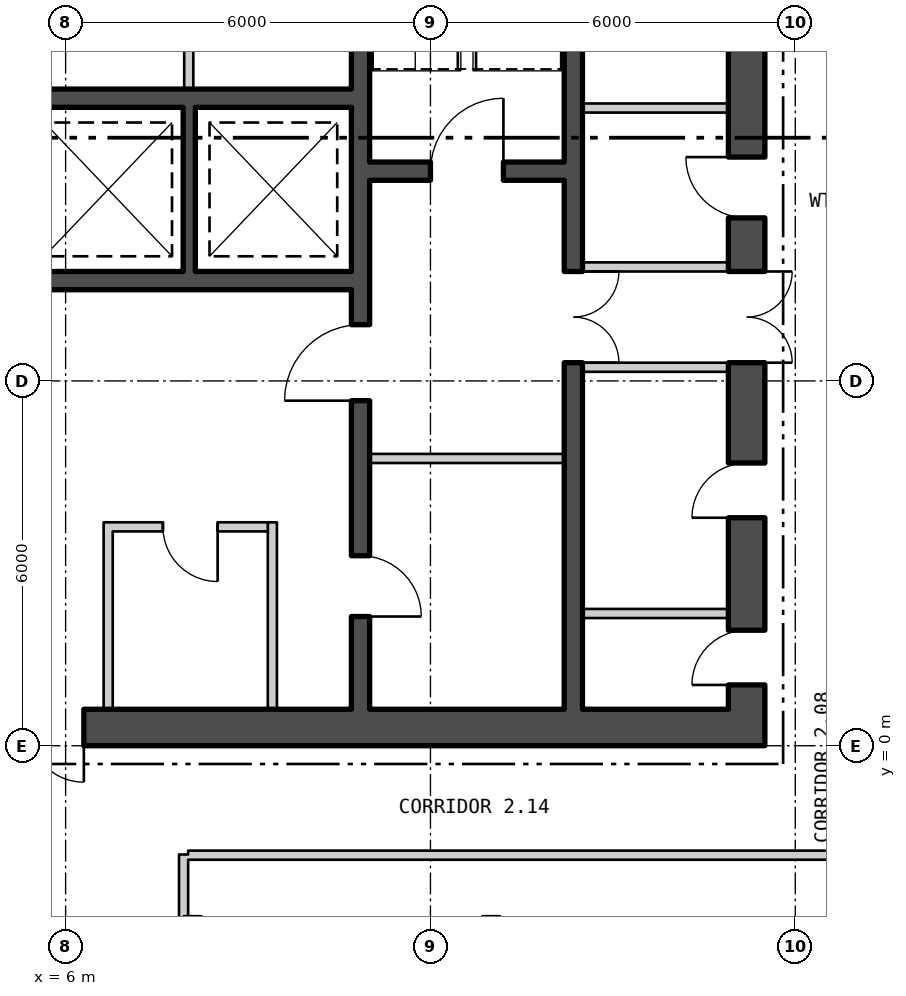
"""IFC4 building model, lengths in metres.
Left out: names, types, materials, properties, quantities, classifications, styles, units other than length and angle.
Written with IfcOpenShell. Run it as: python <this file> out.ifc"""

import sys

from ifc_helpers import new_model, si_unit, direction, frame, frame_2d, origin, origin_2d, place, context, subcontext, project, spatial, polyline, rectangle, i_section, outline, extrude, element, fill, save


model = new_model("IFC4")
c1 = context("Model", 3, precision=1e-05, world=origin(), true_north=direction((0.0, 1.0)))
c2 = subcontext(c1, "Body", "Model", "MODEL_VIEW")
j1 = project(units=[si_unit("LENGTHUNIT", "METRE"), si_unit("PLANEANGLEUNIT", "RADIAN")], contexts=[c1])
p1 = place(None, origin())
s1 = spatial("IfcSite", under=j1, at=p1, CompositionType="ELEMENT")
p2 = place(p1, origin())
s2 = spatial("IfcBuilding", under=s1, at=p2, CompositionType="ELEMENT")
p3 = place(p2, frame((0.0, 0.0, 33.3)))
s3 = spatial("IfcBuildingStorey", under=s2, at=p3, CompositionType="ELEMENT", Elevation=33.3)
for number, where, z_axis, x_axis in (
    (1, (8.09, -3.2, 0.0), (0.0, 0.0, 1.0), (1.0, 0.0, 0.0)),
    (2, (13.0, -3.2, 0.0), (0.0, 0.0, 1.0), (1.0, 0.0, 0.0)),
):
    element("IfcColumn", number, at=place(p3, frame(where, z_axis=z_axis, x_axis=x_axis)), inside=s3, PredefinedType="COLUMN", context=c2, shape_type="SweptSolid", body=[
        extrude(i_section(OverallWidth=0.303, OverallDepth=0.814, WebThickness=0.021, FlangeThickness=0.04, at=origin_2d()), origin(), (0.0, 0.0, 1.0), 4.5),
    ])
p4 = place(p3, frame((5.75, -29.605, -0.18), z_axis=(0.0, 0.0, 1.0), x_axis=(0.500000335318, 0.866025210188, 0.0)))
e3 = element("IfcWall", 3, at=p4, inside=s3, PredefinedType="SOLIDWALL", context=c2, shape_type="SweptSolid", body=[
    extrude(outline(polyline([(-0.13, -0.225), (45.88, -0.225), (45.62, 0.225), (0.13, 0.225), (-0.13, -0.225)])), origin(), (0.0, 0.0, 1.0), 4.28),
])
p5 = place(p4, frame((1.425, 0.0, 1.08)))
e4 = element("IfcOpeningElement", 4, at=p5, cuts=e3, PredefinedType="OPENING", context=c2, shape_type="SweptSolid", body=[
    extrude(rectangle(XDim=2.4, YDim=2.6, at=frame_2d((1.2, 1.3))), frame((0.0, 0.235, 0.0), z_axis=(0.0, -1.0, 0.0), x_axis=(1.0, 0.0, 0.0)), (0.0, 0.0, 1.0), 0.47),
])
p6 = place(p4, frame((5.895, 0.0, 1.08)))
e5 = element("IfcOpeningElement", 5, at=p6, cuts=e3, PredefinedType="OPENING", context=c2, shape_type="SweptSolid", body=[
    extrude(rectangle(XDim=2.4, YDim=2.6, at=frame_2d((1.2, 1.3))), frame((0.0, 0.235, 0.0), z_axis=(0.0, -1.0, 0.0), x_axis=(1.0, 0.0, 0.0)), (0.0, 0.0, 1.0), 0.47),
])
p7 = place(p4, frame((10.403, 0.0, 1.08)))
e6 = element("IfcOpeningElement", 6, at=p7, cuts=e3, PredefinedType="OPENING", context=c2, shape_type="SweptSolid", body=[
    extrude(rectangle(XDim=2.4, YDim=2.6, at=frame_2d((1.2, 1.3))), frame((0.0, 0.235, 0.0), z_axis=(0.0, -1.0, 0.0), x_axis=(1.0, 0.0, 0.0)), (0.0, 0.0, 1.0), 0.47),
])
p8 = place(p4, frame((14.912, 0.0, 1.08)))
e7 = element("IfcOpeningElement", 7, at=p8, cuts=e3, PredefinedType="OPENING", context=c2, shape_type="SweptSolid", body=[
    extrude(rectangle(XDim=2.4, YDim=2.6, at=frame_2d((1.2, 1.3))), frame((0.0, 0.235, 0.0), z_axis=(0.0, -1.0, 0.0), x_axis=(1.0, 0.0, 0.0)), (0.0, 0.0, 1.0), 0.47),
])
p9 = place(p4, frame((19.421, 0.0, 1.08)))
e8 = element("IfcOpeningElement", 8, at=p9, cuts=e3, PredefinedType="OPENING", context=c2, shape_type="SweptSolid", body=[
    extrude(rectangle(XDim=2.4, YDim=2.6, at=frame_2d((1.2, 1.3))), frame((0.0, 0.235, 0.0), z_axis=(0.0, -1.0, 0.0), x_axis=(1.0, 0.0, 0.0)), (0.0, 0.0, 1.0), 0.47),
])
p10 = place(p4, frame((23.929, 0.0, 1.08)))
e9 = element("IfcOpeningElement", 9, at=p10, cuts=e3, PredefinedType="OPENING", context=c2, shape_type="SweptSolid", body=[
    extrude(rectangle(XDim=2.4, YDim=2.6, at=frame_2d((1.2, 1.3))), frame((0.0, 0.235, 0.0), z_axis=(0.0, -1.0, 0.0), x_axis=(1.0, 0.0, 0.0)), (0.0, 0.0, 1.0), 0.47),
])
p11 = place(p4, frame((28.438, 0.0, 1.08)))
e10 = element("IfcOpeningElement", 10, at=p11, cuts=e3, PredefinedType="OPENING", context=c2, shape_type="SweptSolid", body=[
    extrude(rectangle(XDim=2.4, YDim=2.6, at=frame_2d((1.2, 1.3))), frame((0.0, 0.235, 0.0), z_axis=(0.0, -1.0, 0.0), x_axis=(1.0, 0.0, 0.0)), (0.0, 0.0, 1.0), 0.47),
])
p12 = place(p4, frame((32.947, 0.0, 1.08)))
e11 = element("IfcOpeningElement", 11, at=p12, cuts=e3, PredefinedType="OPENING", context=c2, shape_type="SweptSolid", body=[
    extrude(rectangle(XDim=2.4, YDim=2.6, at=frame_2d((1.2, 1.3))), frame((0.0, 0.235, 0.0), z_axis=(0.0, -1.0, 0.0), x_axis=(1.0, 0.0, 0.0)), (0.0, 0.0, 1.0), 0.47),
])
p13 = place(p4, frame((37.455, 0.0, 1.08)))
e12 = element("IfcOpeningElement", 12, at=p13, cuts=e3, PredefinedType="OPENING", context=c2, shape_type="SweptSolid", body=[
    extrude(rectangle(XDim=2.4, YDim=2.6, at=frame_2d((1.2, 1.3))), frame((0.0, 0.235, 0.0), z_axis=(0.0, -1.0, 0.0), x_axis=(1.0, 0.0, 0.0)), (0.0, 0.0, 1.0), 0.47),
])
p14 = place(p4, frame((41.925, 0.0, 1.08)))
e13 = element("IfcOpeningElement", 13, at=p14, cuts=e3, PredefinedType="OPENING", context=c2, shape_type="SweptSolid", body=[
    extrude(rectangle(XDim=2.4, YDim=2.6, at=frame_2d((1.2, 1.3))), frame((0.0, 0.235, 0.0), z_axis=(0.0, -1.0, 0.0), x_axis=(1.0, 0.0, 0.0)), (0.0, 0.0, 1.0), 0.47),
])
p15 = place(p3, frame((-17.5, 0.3, 0.0), z_axis=(0.0, 0.0, 1.0), x_axis=(1.0, 0.0, 0.0)))
e14 = element("IfcWall", 14, at=p15, inside=s3, PredefinedType="SHEAR", context=c2, shape_type="SweptSolid", body=[
    extrude(rectangle(XDim=35.0, YDim=0.6, at=frame_2d((17.5, 0.0))), origin(), (0.0, 0.0, 1.0), 4.3),
])
p16 = place(p15, frame((12.0, 0.0, 0.0)))
e15 = element("IfcOpeningElement", 15, at=p16, cuts=e14, PredefinedType="OPENING", context=c2, shape_type="SweptSolid", body=[
    extrude(rectangle(XDim=1.8, YDim=2.4, at=frame_2d((0.9, 1.2))), frame((0.0, 0.31, 0.0), z_axis=(0.0, -1.0, 0.0), x_axis=(1.0, 0.0, 0.0)), (0.0, 0.0, 1.0), 0.62),
])
p17 = place(p15, frame((22.0, 0.0, 0.0)))
e16 = element("IfcOpeningElement", 16, at=p17, cuts=e14, PredefinedType="OPENING", context=c2, shape_type="SweptSolid", body=[
    extrude(rectangle(XDim=1.8, YDim=2.4, at=frame_2d((0.9, 1.2))), frame((0.0, 0.31, 0.0), z_axis=(0.0, -1.0, 0.0), x_axis=(1.0, 0.0, 0.0)), (0.0, 0.0, 1.0), 0.62),
])
p18 = place(p3, frame((17.2, 0.6, 0.0), z_axis=(0.0, 0.0, 1.0), x_axis=(0.0, 1.0, 0.0)))
e17 = element("IfcWall", 17, at=p18, inside=s3, PredefinedType="SHEAR", context=c2, shape_type="SweptSolid", body=[
    extrude(rectangle(XDim=16.8, YDim=0.6, at=frame_2d((8.4, 0.0))), origin(), (0.0, 0.0, 1.0), 4.3),
])
p19 = place(p18, frame((5.7, 0.0, 0.0)))
e18 = element("IfcOpeningElement", 18, at=p19, cuts=e17, PredefinedType="OPENING", context=c2, shape_type="SweptSolid", body=[
    extrude(rectangle(XDim=1.5, YDim=2.1, at=frame_2d((0.75, 1.05))), frame((0.0, 0.31, 0.0), z_axis=(0.0, -1.0, 0.0), x_axis=(1.0, 0.0, 0.0)), (0.0, 0.0, 1.0), 0.62),
])
p20 = place(p18, frame((0.4, 0.0, 0.0)))
e19 = element("IfcOpeningElement", 19, at=p20, cuts=e17, PredefinedType="OPENING", context=c2, shape_type="SweptSolid", body=[
    extrude(rectangle(XDim=0.9, YDim=2.1, at=frame_2d((0.45, 1.05))), frame((0.0, 0.31, 0.0), z_axis=(0.0, -1.0, 0.0), x_axis=(1.0, 0.0, 0.0)), (0.0, 0.0, 1.0), 0.62),
])
p21 = place(p18, frame((3.15, 0.0, 0.0)))
e20 = element("IfcOpeningElement", 20, at=p21, cuts=e17, PredefinedType="OPENING", context=c2, shape_type="SweptSolid", body=[
    extrude(rectangle(XDim=0.9, YDim=2.1, at=frame_2d((0.45, 1.05))), frame((0.0, 0.31, 0.0), z_axis=(0.0, -1.0, 0.0), x_axis=(1.0, 0.0, 0.0)), (0.0, 0.0, 1.0), 0.62),
])
p22 = place(p18, frame((8.082, 0.0, 0.0)))
e21 = element("IfcOpeningElement", 21, at=p22, cuts=e17, PredefinedType="OPENING", context=c2, shape_type="SweptSolid", body=[
    extrude(rectangle(XDim=1.0, YDim=2.1, at=frame_2d((0.5, 1.05))), frame((0.0, 0.31, 0.0), z_axis=(0.0, -1.0, 0.0), x_axis=(1.0, 0.0, 0.0)), (0.0, 0.0, 1.0), 0.62),
])
p23 = place(p18, frame((11.801, 0.0, 0.0)))
e22 = element("IfcOpeningElement", 22, at=p23, cuts=e17, PredefinedType="OPENING", context=c2, shape_type="SweptSolid", body=[
    extrude(rectangle(XDim=0.9, YDim=2.1, at=frame_2d((0.45, 1.05))), frame((0.0, 0.31, 0.0), z_axis=(0.0, -1.0, 0.0), x_axis=(1.0, 0.0, 0.0)), (0.0, 0.0, 1.0), 0.62),
])
p24 = place(p18, frame((15.294, 0.0, 0.0)))
e23 = element("IfcOpeningElement", 23, at=p24, cuts=e17, PredefinedType="OPENING", context=c2, shape_type="SweptSolid", body=[
    extrude(rectangle(XDim=0.9, YDim=2.1, at=frame_2d((0.45, 1.05))), frame((0.0, 0.31, 0.0), z_axis=(0.0, -1.0, 0.0), x_axis=(1.0, 0.0, 0.0)), (0.0, 0.0, 1.0), 0.62),
])
p25 = place(p3, frame((10.85, 0.6, 0.0), z_axis=(0.0, 0.0, 1.0), x_axis=(0.0, 1.0, 0.0)))
e24 = element("IfcWall", 24, at=p25, inside=s3, PredefinedType="SHEAR", context=c2, shape_type="SweptSolid", body=[
    extrude(rectangle(XDim=16.8, YDim=0.3, at=frame_2d((8.4, 0.0))), origin(), (0.0, 0.0, 1.0), 4.3),
])
p26 = place(p25, frame((5.075, 0.0, 0.0)))
e25 = element("IfcOpeningElement", 25, at=p26, cuts=e24, PredefinedType="OPENING", context=c2, shape_type="SweptSolid", body=[
    extrude(rectangle(XDim=1.25, YDim=2.1, at=frame_2d((0.625, 1.05))), frame((0.0, 0.16, 0.0), z_axis=(0.0, -1.0, 0.0), x_axis=(1.0, 0.0, 0.0)), (0.0, 0.0, 1.0), 0.32),
])
p27 = place(p25, frame((1.525, 0.0, 0.0)))
e26 = element("IfcOpeningElement", 26, at=p27, cuts=e24, PredefinedType="OPENING", context=c2, shape_type="SweptSolid", body=[
    extrude(rectangle(XDim=1.0, YDim=2.1, at=frame_2d((0.5, 1.05))), frame((0.0, 0.16, 0.0), z_axis=(0.0, -1.0, 0.0), x_axis=(1.0, 0.0, 0.0)), (0.0, 0.0, 1.0), 0.32),
])
p28 = place(p3, frame((14.35, 0.6, 0.0), z_axis=(0.0, 0.0, 1.0), x_axis=(0.0, 1.0, 0.0)))
e27 = element("IfcWall", 27, at=p28, inside=s3, PredefinedType="SHEAR", context=c2, shape_type="SweptSolid", body=[
    extrude(rectangle(XDim=16.8, YDim=0.3, at=frame_2d((8.4, 0.0))), origin(), (0.0, 0.0, 1.0), 4.3),
])
p29 = place(p28, frame((5.7, 0.0, 0.0)))
e28 = element("IfcOpeningElement", 28, at=p29, cuts=e27, PredefinedType="OPENING", context=c2, shape_type="SweptSolid", body=[
    extrude(rectangle(XDim=1.5, YDim=2.1, at=frame_2d((0.75, 1.05))), frame((0.0, 0.16, 0.0), z_axis=(0.0, -1.0, 0.0), x_axis=(1.0, 0.0, 0.0)), (0.0, 0.0, 1.0), 0.32),
])
p30 = place(p3, frame((11.0, 9.45, 0.0), z_axis=(0.0, 0.0, 1.0), x_axis=(1.0, 0.0, 0.0)))
e29 = element("IfcWall", 29, at=p30, inside=s3, PredefinedType="SHEAR", context=c2, shape_type="SweptSolid", body=[
    extrude(rectangle(XDim=3.2, YDim=0.3, at=frame_2d((1.6, 0.0))), origin(), (0.0, 0.0, 1.0), 4.3),
])
p31 = place(p30, frame((1.0, 0.0, 0.0)))
e30 = element("IfcOpeningElement", 30, at=p31, cuts=e29, PredefinedType="OPENING", context=c2, shape_type="SweptSolid", body=[
    extrude(rectangle(XDim=1.2, YDim=2.1, at=frame_2d((0.6, 1.05))), frame((0.0, 0.16, 0.0), z_axis=(0.0, -1.0, 0.0), x_axis=(1.0, 0.0, 0.0)), (0.0, 0.0, 1.0), 0.32),
])
for number, where, z_axis, x_axis in (
    (31, (2.6, 10.65, 0.0), (0.0, 0.0, 1.0), (1.0, 0.0, 0.0)),
    (32, (2.6, 7.65, 0.0), (0.0, 0.0, 1.0), (1.0, 0.0, 0.0)),
):
    element("IfcWall", number, at=place(p3, frame(where, z_axis=z_axis, x_axis=x_axis)), inside=s3, PredefinedType="SHEAR", context=c2, shape_type="SweptSolid", body=[
        extrude(rectangle(XDim=8.1, YDim=0.3, at=frame_2d((4.05, 0.0))), origin(), (0.0, 0.0, 1.0), 4.3),
    ])
p32 = place(p3, frame((8.033, 7.8, 0.0), z_axis=(0.0, 0.0, 1.0), x_axis=(0.0, 1.0, 0.0)))
e33 = element("IfcWall", 33, at=p32, inside=s3, PredefinedType="SHEAR", context=c2, shape_type="SweptSolid", body=[
    extrude(rectangle(XDim=2.7, YDim=0.2, at=frame_2d((1.35, 0.0))), origin(), (0.0, 0.0, 1.0), 4.3),
])
p33 = place(p3, frame((8.025, 10.8, 0.0), z_axis=(0.0, 0.0, 1.0), x_axis=(0.0, 1.0, 0.0)))
e34 = element("IfcWall", 34, at=p33, inside=s3, PredefinedType="PARTITIONING", context=c2, shape_type="SweptSolid", body=[
    extrude(rectangle(XDim=3.6, YDim=0.15, at=frame_2d((1.8, 0.0))), origin(), (0.0, 0.0, 1.0), 4.3),
])
p34 = place(p33, frame((1.175, 0.0, 0.0)))
e35 = element("IfcOpeningElement", 35, at=p34, cuts=e34, PredefinedType="OPENING", context=c2, shape_type="SweptSolid", body=[
    extrude(rectangle(XDim=1.25, YDim=2.1, at=frame_2d((0.625, 1.05))), frame((0.0, 0.085, 0.0), z_axis=(0.0, -1.0, 0.0), x_axis=(1.0, 0.0, 0.0)), (0.0, 0.0, 1.0), 0.17),
])
p35 = place(p3, frame((11.0, 4.725, 0.0), z_axis=(0.0, 0.0, 1.0), x_axis=(1.0, 0.0, 0.0)))
e36 = element("IfcWall", 36, at=p35, inside=s3, PredefinedType="PARTITIONING", context=c2, shape_type="SweptSolid", body=[
    extrude(rectangle(XDim=3.2, YDim=0.15, at=frame_2d((1.6, 0.0))), origin(), (0.0, 0.0, 1.0), 4.3),
])
for number, where, z_axis, x_axis in (
    (37, (14.5, 6.225, 0.0), (0.0, 0.0, 1.0), (1.0, 0.0, 0.0)),
    (38, (14.5, 7.875, 0.0), (0.0, 0.0, 1.0), (1.0, 0.0, 0.0)),
    (39, (14.5, 2.175, 0.0), (0.0, 0.0, 1.0), (1.0, 0.0, 0.0)),
    (40, (14.5, 10.489, 0.0), (0.0, 0.0, 1.0), (1.0, 0.0, 0.0)),
):
    element("IfcWall", number, at=place(p3, frame(where, z_axis=z_axis, x_axis=x_axis)), inside=s3, PredefinedType="PARTITIONING", context=c2, shape_type="SweptSolid", body=[
        extrude(rectangle(XDim=2.4, YDim=0.15, at=frame_2d((1.2, 0.0))), origin(), (0.0, 0.0, 1.0), 4.3),
    ])
for number, where, z_axis, x_axis in (
    (41, (6.7, 0.6, 0.0), (0.0, 0.0, 1.0), (0.0, 1.0, 0.0)),
    (42, (9.4, 0.6, 0.0), (0.0, 0.0, 1.0), (0.0, 1.0, 0.0)),
):
    element("IfcWall", number, at=place(p3, frame(where, z_axis=z_axis, x_axis=x_axis)), inside=s3, PredefinedType="PARTITIONING", context=c2, shape_type="SweptSolid", body=[
        extrude(rectangle(XDim=3.075, YDim=0.15, at=frame_2d((1.538, 0.0))), origin(), (0.0, 0.0, 1.0), 4.3),
    ])
p36 = place(p3, frame((6.775, 3.6, 0.0), z_axis=(0.0, 0.0, 1.0), x_axis=(1.0, 0.0, 0.0)))
e43 = element("IfcWall", 43, at=p36, inside=s3, PredefinedType="PARTITIONING", context=c2, shape_type="SweptSolid", body=[
    extrude(rectangle(XDim=2.55, YDim=0.15, at=frame_2d((1.275, 0.0))), origin(), (0.0, 0.0, 1.0), 4.3),
])
p37 = place(p36, frame((0.825, 0.0, 0.0)))
e44 = element("IfcOpeningElement", 44, at=p37, cuts=e43, PredefinedType="OPENING", context=c2, shape_type="SweptSolid", body=[
    extrude(rectangle(XDim=0.9, YDim=2.1, at=frame_2d((0.45, 1.05))), frame((0.0, 0.085, 0.0), z_axis=(0.0, -1.0, 0.0), x_axis=(1.0, 0.0, 0.0)), (0.0, 0.0, 1.0), 0.17),
])
p38 = place(p3, frame((7.94, -3.557, 0.0), z_axis=(0.0, 0.0, 1.0), x_axis=(0.0, 1.0, 0.0)))
e45 = element("IfcWall", 45, at=p38, inside=s3, PredefinedType="PARTITIONING", context=c2, shape_type="SweptSolid", body=[
    extrude(rectangle(XDim=1.768, YDim=0.15, at=frame_2d((0.884, 0.0))), origin(), (0.0, 0.0, 1.0), 4.3),
])
p39 = place(p3, frame((8.015, -1.8, 0.0), z_axis=(0.0, 0.0, 1.0), x_axis=(1.0, 0.0, 0.0)))
e46 = element("IfcWall", 46, at=p39, inside=s3, PredefinedType="PARTITIONING", context=c2, shape_type="SweptSolid", body=[
    extrude(rectangle(XDim=11.21, YDim=0.15, at=frame_2d((5.605, 0.0))), origin(), (0.0, 0.0, 1.0), 4.3),
])
p40 = place(p31, origin())
e47 = element("IfcDoor", 47, at=p40, inside=s3, OperationType="SINGLE_SWING_LEFT", PredefinedType="DOOR", context=c2, shape_type="SweptSolid", body=[
    extrude(rectangle(XDim=1.2, YDim=2.1, at=frame_2d((0.6, 1.05))), frame((0.0, 0.025, 0.0), z_axis=(0.0, -1.0, 0.0), x_axis=(1.0, 0.0, 0.0)), (0.0, 0.0, 1.0), 0.05),
])
fill(e30, e47)
p41 = place(p26, origin())
e48 = element("IfcDoor", 48, at=p41, inside=s3, OperationType="SINGLE_SWING_RIGHT", PredefinedType="DOOR", context=c2, shape_type="SweptSolid", body=[
    extrude(rectangle(XDim=1.25, YDim=2.1, at=frame_2d((0.625, 1.05))), frame((0.0, 0.025, 0.0), z_axis=(0.0, -1.0, 0.0), x_axis=(1.0, 0.0, 0.0)), (0.0, 0.0, 1.0), 0.05),
])
fill(e25, e48)
p42 = place(p27, origin())
e49 = element("IfcDoor", 49, at=p42, inside=s3, OperationType="SINGLE_SWING_LEFT", PredefinedType="DOOR", context=c2, shape_type="SweptSolid", body=[
    extrude(rectangle(XDim=1.0, YDim=2.1, at=frame_2d((0.5, 1.05))), frame((0.0, 0.025, 0.0), z_axis=(0.0, -1.0, 0.0), x_axis=(1.0, 0.0, 0.0)), (0.0, 0.0, 1.0), 0.05),
])
fill(e26, e49)
p43 = place(p29, origin())
e50 = element("IfcDoor", 50, at=p43, inside=s3, OperationType="DOUBLE_DOOR_SINGLE_SWING", PredefinedType="DOOR", context=c2, shape_type="SweptSolid", body=[
    extrude(rectangle(XDim=1.5, YDim=2.1, at=frame_2d((0.75, 1.05))), frame((0.0, 0.025, 0.0), z_axis=(0.0, -1.0, 0.0), x_axis=(1.0, 0.0, 0.0)), (0.0, 0.0, 1.0), 0.05),
])
fill(e28, e50)
p44 = place(p19, origin())
e51 = element("IfcDoor", 51, at=p44, inside=s3, OperationType="DOUBLE_DOOR_SINGLE_SWING", PredefinedType="DOOR", context=c2, shape_type="SweptSolid", body=[
    extrude(rectangle(XDim=1.5, YDim=2.1, at=frame_2d((0.75, 1.05))), frame((0.0, 0.025, 0.0), z_axis=(0.0, -1.0, 0.0), x_axis=(1.0, 0.0, 0.0)), (0.0, 0.0, 1.0), 0.05),
])
fill(e18, e51)
p45 = place(p20, origin())
e52 = element("IfcDoor", 52, at=p45, inside=s3, OperationType="SINGLE_SWING_RIGHT", PredefinedType="DOOR", context=c2, shape_type="SweptSolid", body=[
    extrude(rectangle(XDim=0.9, YDim=2.1, at=frame_2d((0.45, 1.05))), frame((0.0, 0.025, 0.0), z_axis=(0.0, -1.0, 0.0), x_axis=(1.0, 0.0, 0.0)), (0.0, 0.0, 1.0), 0.05),
])
fill(e19, e52)
p46 = place(p21, origin())
e53 = element("IfcDoor", 53, at=p46, inside=s3, OperationType="SINGLE_SWING_RIGHT", PredefinedType="DOOR", context=c2, shape_type="SweptSolid", body=[
    extrude(rectangle(XDim=0.9, YDim=2.1, at=frame_2d((0.45, 1.05))), frame((0.0, 0.025, 0.0), z_axis=(0.0, -1.0, 0.0), x_axis=(1.0, 0.0, 0.0)), (0.0, 0.0, 1.0), 0.05),
])
fill(e20, e53)
p47 = place(p22, origin())
e54 = element("IfcDoor", 54, at=p47, inside=s3, OperationType="SINGLE_SWING_LEFT", PredefinedType="DOOR", context=c2, shape_type="SweptSolid", body=[
    extrude(rectangle(XDim=1.0, YDim=2.1, at=frame_2d((0.5, 1.05))), frame((0.0, 0.025, 0.0), z_axis=(0.0, -1.0, 0.0), x_axis=(1.0, 0.0, 0.0)), (0.0, 0.0, 1.0), 0.05),
])
fill(e21, e54)
p48 = place(p37, origin())
e55 = element("IfcDoor", 55, at=p48, inside=s3, OperationType="SINGLE_SWING_RIGHT", PredefinedType="DOOR", context=c2, shape_type="SweptSolid", body=[
    extrude(rectangle(XDim=0.9, YDim=2.1, at=frame_2d((0.45, 1.05))), frame((0.0, 0.025, 0.0), z_axis=(0.0, -1.0, 0.0), x_axis=(1.0, 0.0, 0.0)), (0.0, 0.0, 1.0), 0.05),
])
fill(e44, e55)
p49 = place(p17, origin())
e56 = element("IfcDoor", 56, at=p49, inside=s3, OperationType="DOUBLE_DOOR_SINGLE_SWING", PredefinedType="DOOR", context=c2, shape_type="SweptSolid", body=[
    extrude(rectangle(XDim=1.8, YDim=2.4, at=frame_2d((0.9, 1.2))), frame((0.0, 0.025, 0.0), z_axis=(0.0, -1.0, 0.0), x_axis=(1.0, 0.0, 0.0)), (0.0, 0.0, 1.0), 0.05),
])
fill(e16, e56)
save(model, sys.argv[1])
